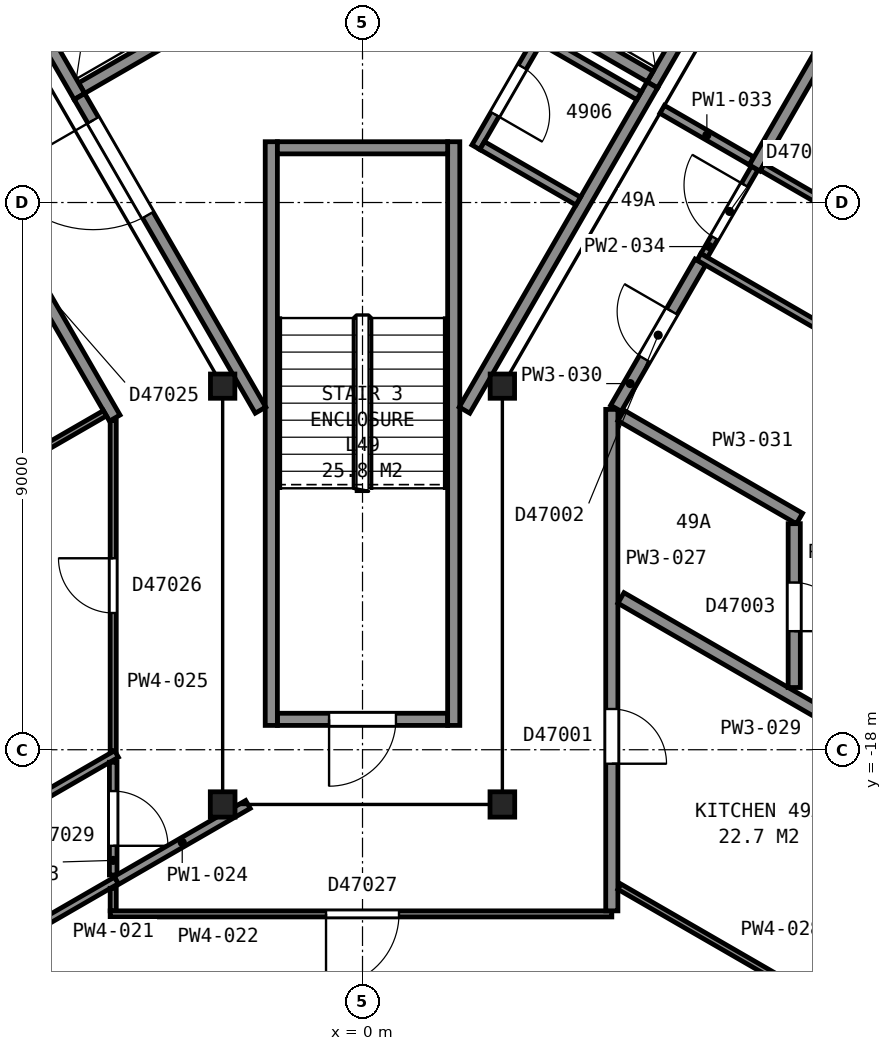
"""IFC4 building model, lengths in metres.
Left out: names, types, materials, properties, quantities, classifications, styles, units other than length and angle.
Written with IfcOpenShell. Run it as: python <this file> out.ifc"""

import sys

from ifc_helpers import new_model, si_unit, direction, frame, frame_2d, origin, origin_2d, place, context, subcontext, project, spatial, rectangle, i_section, extrude, element, fill, save


model = new_model("IFC4")
c1 = context("Model", 3, precision=1e-05, world=origin(), true_north=direction((0.0, 1.0)))
c2 = subcontext(c1, "Body", "Model", "MODEL_VIEW")
j1 = project(units=[si_unit("LENGTHUNIT", "METRE"), si_unit("PLANEANGLEUNIT", "RADIAN")], contexts=[c1])
p1 = place(None, origin())
s1 = spatial("IfcSite", under=j1, at=p1, CompositionType="ELEMENT")
p2 = place(p1, origin())
s2 = spatial("IfcBuilding", under=s1, at=p2, CompositionType="ELEMENT")
p3 = place(p2, frame((0.0, 0.0, 196.9)))
s3 = spatial("IfcBuildingStorey", under=s2, at=p3, CompositionType="ELEMENT", Elevation=196.9)
p4 = place(p3, frame((-2.3, -12.02, 0.0), z_axis=(0.0, 0.0, 1.0), x_axis=(1.0, 0.0, 0.0)))
e1 = element("IfcColumn", 1, at=p4, inside=s3, PredefinedType="COLUMN", context=c2, shape_type="SweptSolid", body=[
    extrude(i_section(OverallWidth=0.401, OverallDepth=0.399, WebThickness=0.025, FlangeThickness=0.04, FilletRadius=0.015, at=origin_2d()), origin(), (0.0, 0.0, 1.0), 3.7),
])
for number, where, z_axis, x_axis in (
    (2, (-2.3, -18.9, 0.0), (0.0, 0.0, 1.0), (-1.0, 0.0, 0.0)),
    (3, (2.3, -18.9, 0.0), (0.0, 0.0, 1.0), (-1.0, 0.0, 0.0)),
):
    element("IfcColumn", number, at=place(p3, frame(where, z_axis=z_axis, x_axis=x_axis)), inside=s3, PredefinedType="COLUMN", context=c2, shape_type="SweptSolid", body=[
        extrude(i_section(OverallWidth=0.406, OverallDepth=0.417, WebThickness=0.03, FlangeThickness=0.048, FilletRadius=0.015, at=origin_2d()), origin(), (0.0, 0.0, 1.0), 3.7),
    ])
p5 = place(p3, frame((2.3, -12.02, 0.0), z_axis=(0.0, 0.0, 1.0), x_axis=(1.0, 0.0, 0.0)))
e4 = element("IfcColumn", 4, at=p5, inside=s3, PredefinedType="COLUMN", context=c2, shape_type="SweptSolid", body=[
    extrude(i_section(OverallWidth=0.401, OverallDepth=0.399, WebThickness=0.025, FlangeThickness=0.04, FilletRadius=0.015, at=origin_2d()), origin(), (0.0, 0.0, 1.0), 3.7),
])
p6 = place(p3, frame((-1.4, -17.5, 0.0), z_axis=(0.0, 0.0, 1.0), x_axis=(1.0, 0.0, 0.0)))
e5 = element("IfcWall", 5, at=p6, inside=s3, PredefinedType="PARTITIONING", context=c2, shape_type="SweptSolid", body=[
    extrude(rectangle(XDim=2.8, YDim=0.2, at=frame_2d((1.4, 0.0))), origin(), (0.0, 0.0, 1.0), 3.45),
])
p7 = place(p6, frame((0.85, 0.0, 0.0)))
e6 = element("IfcOpeningElement", 6, at=p7, cuts=e5, PredefinedType="OPENING", context=c2, shape_type="SweptSolid", body=[
    extrude(rectangle(XDim=1.1, YDim=2.1, at=frame_2d((0.55, 1.05))), frame((0.0, 0.11, 0.0), z_axis=(0.0, -1.0, 0.0), x_axis=(1.0, 0.0, 0.0)), (0.0, 0.0, 1.0), 0.22),
])
for number, where, z_axis, x_axis in (
    (7, (1.5, -8.0, 0.0), (0.0, 0.0, 1.0), (0.0, -1.0, 0.0)),
    (8, (-1.5, -8.0, 0.0), (0.0, 0.0, 1.0), (0.0, -1.0, 0.0)),
):
    element("IfcWall", number, at=place(p3, frame(where, z_axis=z_axis, x_axis=x_axis)), inside=s3, PredefinedType="PARTITIONING", context=c2, shape_type="SweptSolid", body=[
        extrude(rectangle(XDim=9.6, YDim=0.2, at=frame_2d((4.8, 0.0))), origin(), (0.0, 0.0, 1.0), 3.45),
    ])
p8 = place(p3, frame((-1.4, -8.1, 0.0), z_axis=(0.0, 0.0, 1.0), x_axis=(1.0, 0.0, 0.0)))
e9 = element("IfcWall", 9, at=p8, inside=s3, PredefinedType="PARTITIONING", context=c2, shape_type="SweptSolid", body=[
    extrude(rectangle(XDim=2.8, YDim=0.2, at=frame_2d((1.4, 0.0))), origin(), (0.0, 0.0, 1.0), 3.45),
])
p9 = place(p3, frame((-4.62, -7.118, 0.0), z_axis=(0.0, 0.0, 1.0), x_axis=(0.866036909293, 0.499980071345, 0.0)))
e10 = element("IfcWall", 10, at=p9, inside=s3, PredefinedType="PARTITIONING", context=c2, shape_type="SweptSolid", body=[
    extrude(rectangle(XDim=1.75, YDim=0.2, at=frame_2d((0.875, 0.0))), origin(), (0.0, 0.0, 1.0), 3.7),
])
p10 = place(p3, frame((4.766, -7.065, 0.0), z_axis=(0.0, 0.0, 1.0), x_axis=(0.499948979701, 0.866054858364, 0.0)))
e11 = element("IfcWall", 11, at=p10, inside=s3, PredefinedType="PARTITIONING", context=c2, shape_type="SweptSolid", body=[
    extrude(rectangle(XDim=2.55, YDim=0.2, at=frame_2d((1.275, 0.0))), origin(), (0.0, 0.0, 1.0), 3.7),
])
p11 = place(p3, frame((-4.656, -7.255, 0.0), z_axis=(0.0, 0.0, 1.0), x_axis=(-0.499990435942, 0.866030925526, 0.0)))
e12 = element("IfcWall", 12, at=p11, inside=s3, PredefinedType="PARTITIONING", context=c2, shape_type="SweptSolid", body=[
    extrude(rectangle(XDim=2.55, YDim=0.2, at=frame_2d((1.275, 0.0))), origin(), (0.0, 0.0, 1.0), 3.7),
])
p12 = place(p3, frame((4.73, -6.928, 0.0), z_axis=(0.0, 0.0, 1.0), x_axis=(-0.866036909293, 0.499980071345, 0.0)))
e13 = element("IfcWall", 13, at=p12, inside=s3, PredefinedType="PARTITIONING", context=c2, shape_type="SweptSolid", body=[
    extrude(rectangle(XDim=1.75, YDim=0.2, at=frame_2d((0.875, 0.0))), origin(), (0.0, 0.0, 1.0), 3.7),
])
p13 = place(p3, frame((-4.655, -7.257, 0.0), z_axis=(0.0, 0.0, 1.0), x_axis=(0.499966124405, -0.866044960985, 0.0)))
e14 = element("IfcWall", 14, at=p13, inside=s3, PredefinedType="PARTITIONING", context=c2, shape_type="SweptSolid", body=[
    extrude(rectangle(XDim=5.956, YDim=0.2, at=frame_2d((2.978, 0.0))), origin(), (0.0, 0.0, 1.0), 3.45),
])
p14 = place(p13, frame((0.45, 0.0, 0.0)))
e15 = element("IfcOpeningElement", 15, at=p14, cuts=e14, PredefinedType="OPENING", context=c2, shape_type="SweptSolid", body=[
    extrude(rectangle(XDim=1.8, YDim=2.1, at=frame_2d((0.9, 1.05))), frame((0.0, 0.11, 0.0), z_axis=(0.0, -1.0, 0.0), x_axis=(1.0, 0.0, 0.0)), (0.0, 0.0, 1.0), 0.22),
])
p15 = place(p3, frame((1.677, -12.415, 0.0), z_axis=(0.0, 0.0, 1.0), x_axis=(0.500054337157, 0.865994029939, 0.0)))
e16 = element("IfcWall", 16, at=p15, inside=s3, PredefinedType="PARTITIONING", context=c2, shape_type="SweptSolid", body=[
    extrude(rectangle(XDim=6.177, YDim=0.2, at=frame_2d((3.088, 0.0))), origin(), (0.0, 0.0, 1.0), 3.45),
])
p16 = place(p3, frame((2.939, -6.229, 0.0), z_axis=(0.0, 0.0, 1.0), x_axis=(-0.499961633463, -0.866047553582, 0.0)))
e17 = element("IfcWall", 17, at=p16, inside=s3, PredefinedType="PARTITIONING", context=c2, shape_type="SweptSolid", body=[
    extrude(rectangle(XDim=2.15, YDim=0.15, at=frame_2d((1.075, 0.0))), origin(), (0.0, 0.0, 1.0), 3.45),
])
p17 = place(p16, frame((0.625, 0.0, 0.0)))
e18 = element("IfcOpeningElement", 18, at=p17, cuts=e17, PredefinedType="OPENING", context=c2, shape_type="SweptSolid", body=[
    extrude(rectangle(XDim=0.9, YDim=2.1, at=frame_2d((0.45, 1.05))), frame((0.0, 0.085, 0.0), z_axis=(0.0, -1.0, 0.0), x_axis=(1.0, 0.0, 0.0)), (0.0, 0.0, 1.0), 0.17),
])
p18 = place(p3, frame((1.967, -8.063, 0.0), z_axis=(0.0, 0.0, 1.0), x_axis=(0.865978377894, -0.500081442387, 0.0)))
e19 = element("IfcWall", 19, at=p18, inside=s3, PredefinedType="PARTITIONING", context=c2, shape_type="SweptSolid", body=[
    extrude(rectangle(XDim=1.825, YDim=0.15, at=frame_2d((0.913, 0.0))), origin(), (0.0, 0.0, 1.0), 3.45),
])
p19 = place(p3, frame((2.967, -6.332, 0.0), z_axis=(0.0, 0.0, 1.0), x_axis=(0.866036312054, -0.499981105847, 0.0)))
e20 = element("IfcWall", 20, at=p19, inside=s3, PredefinedType="PARTITIONING", context=c2, shape_type="SweptSolid", body=[
    extrude(rectangle(XDim=1.825, YDim=0.15, at=frame_2d((0.912, 0.0))), origin(), (0.0, 0.0, 1.0), 3.45),
])
p20 = place(p3, frame((-4.075, -12.545, 0.0), z_axis=(0.0, 0.0, 1.0), x_axis=(-0.499999743747, 0.866025551732, 0.0)))
e21 = element("IfcWall", 21, at=p20, inside=s3, PredefinedType="PARTITIONING", context=c2, shape_type="SweptSolid", body=[
    extrude(rectangle(XDim=17.656, YDim=0.2, at=frame_2d((8.828, 0.0))), origin(), (0.0, 0.0, 1.0), 2.362),
])
p21 = place(p20, frame((10.83, 0.0, 0.0)))
e22 = element("IfcOpeningElement", 22, at=p21, cuts=e21, PredefinedType="OPENING", context=c2, shape_type="SweptSolid", body=[
    extrude(rectangle(XDim=0.9, YDim=2.1, at=frame_2d((0.45, 1.05))), frame((0.0, 0.11, 0.0), z_axis=(0.0, -1.0, 0.0), x_axis=(1.0, 0.0, 0.0)), (0.0, 0.0, 1.0), 0.22),
])
p22 = place(p20, frame((7.148, 0.0, 0.0)))
e23 = element("IfcOpeningElement", 23, at=p22, cuts=e21, PredefinedType="OPENING", context=c2, shape_type="SweptSolid", body=[
    extrude(rectangle(XDim=0.9, YDim=2.1, at=frame_2d((0.45, 1.05))), frame((0.0, 0.11, 0.0), z_axis=(0.0, -1.0, 0.0), x_axis=(1.0, 0.0, 0.0)), (0.0, 0.0, 1.0), 0.22),
])
p23 = place(p20, frame((2.198, 0.0, 0.0)))
e24 = element("IfcOpeningElement", 24, at=p23, cuts=e21, PredefinedType="OPENING", context=c2, shape_type="SweptSolid", body=[
    extrude(rectangle(XDim=0.9, YDim=2.1, at=frame_2d((0.45, 1.05))), frame((0.0, 0.11, 0.0), z_axis=(0.0, -1.0, 0.0), x_axis=(1.0, 0.0, 0.0)), (0.0, 0.0, 1.0), 0.22),
])
p24 = place(p3, frame((-11.54, -16.682, 0.0), z_axis=(0.0, 0.0, 1.0), x_axis=(0.866063141794, 0.499934630153, 0.0)))
e25 = element("IfcWall", 25, at=p24, inside=s3, PredefinedType="PARTITIONING", context=c2, shape_type="SweptSolid", body=[
    extrude(rectangle(XDim=8.433, YDim=0.1, at=frame_2d((4.217, 0.0))), origin(), (0.0, 0.0, 1.0), 2.362),
])
p25 = place(p3, frame((-9.066, -20.968, 0.0), z_axis=(0.0, 0.0, 1.0), x_axis=(0.866023559602, 0.500003194204, 0.0)))
e26 = element("IfcWall", 26, at=p25, inside=s3, PredefinedType="PARTITIONING", context=c2, shape_type="SweptSolid", body=[
    extrude(rectangle(XDim=5.796, YDim=0.125, at=frame_2d((2.898, 0.0))), origin(), (0.0, 0.0, 1.0), 2.362),
])
p26 = place(p3, frame((-8.166, -22.527, 0.0), z_axis=(0.0, 0.0, 1.0), x_axis=(0.866042865666, 0.499969753915, 0.0)))
e27 = element("IfcWall", 27, at=p26, inside=s3, PredefinedType="PARTITIONING", context=c2, shape_type="SweptSolid", body=[
    extrude(rectangle(XDim=4.757, YDim=0.125, at=frame_2d((2.378, 0.0))), origin(), (0.0, 0.0, 1.0), 2.362),
])
p27 = place(p3, frame((-4.1, -20.65, 0.0), z_axis=(0.0, 0.0, 1.0), x_axis=(0.0, 1.0, 0.0)))
e28 = element("IfcWall", 28, at=p27, inside=s3, PredefinedType="PARTITIONING", context=c2, shape_type="SweptSolid", body=[
    extrude(rectangle(XDim=0.37, YDim=0.1, at=frame_2d((0.185, 0.0))), origin(), (0.0, 0.0, 1.0), 2.362),
])
p28 = place(p3, frame((4.1, -20.7, 0.0), z_axis=(0.0, 0.0, 1.0), x_axis=(-1.0, 0.0, 0.0)))
e29 = element("IfcWall", 29, at=p28, inside=s3, PredefinedType="PARTITIONING", context=c2, shape_type="SweptSolid", body=[
    extrude(rectangle(XDim=8.25, YDim=0.1, at=frame_2d((4.125, 0.0))), origin(), (0.0, 0.0, 1.0), 2.362),
])
p29 = place(p28, frame((3.5, 0.0, 0.0)))
e30 = element("IfcOpeningElement", 30, at=p29, cuts=e29, PredefinedType="OPENING", context=c2, shape_type="SweptSolid", body=[
    extrude(rectangle(XDim=1.2, YDim=2.1, at=frame_2d((0.6, 1.05))), frame((0.0, 0.06, 0.0), z_axis=(0.0, -1.0, 0.0), x_axis=(1.0, 0.0, 0.0)), (0.0, 0.0, 1.0), 0.12),
])
p30 = place(p3, frame((-4.1, -18.206, 0.0), z_axis=(0.0, 0.0, 1.0), x_axis=(0.0, -1.0, 0.0)))
e31 = element("IfcWall", 31, at=p30, inside=s3, PredefinedType="PARTITIONING", context=c2, shape_type="SweptSolid", body=[
    extrude(rectangle(XDim=1.854, YDim=0.125, at=frame_2d((0.927, 0.0))), origin(), (0.0, 0.0, 1.0), 2.362),
])
p31 = place(p30, frame((0.474, 0.0, 0.0)))
e32 = element("IfcOpeningElement", 32, at=p31, cuts=e31, PredefinedType="OPENING", context=c2, shape_type="SweptSolid", body=[
    extrude(rectangle(XDim=0.9, YDim=2.1, at=frame_2d((0.45, 1.05))), frame((0.0, 0.073, 0.0), z_axis=(0.0, -1.0, 0.0), x_axis=(1.0, 0.0, 0.0)), (0.0, 0.0, 1.0), 0.145),
])
p32 = place(p3, frame((-4.046, -20.149, 0.0), z_axis=(0.0, 0.0, 1.0), x_axis=(0.865916841101, 0.500187988959, 0.0)))
e33 = element("IfcWall", 33, at=p32, inside=s3, PredefinedType="PARTITIONING", context=c2, shape_type="SweptSolid", body=[
    extrude(rectangle(XDim=2.497, YDim=0.15, at=frame_2d((1.248, 0.0))), origin(), (0.0, 0.0, 1.0), 2.362),
])
p33 = place(p3, frame((-4.1, -18.016, 0.0), z_axis=(0.0, 0.0, 1.0), x_axis=(0.0, 1.0, 0.0)))
e34 = element("IfcWall", 34, at=p33, inside=s3, PredefinedType="PARTITIONING", context=c2, shape_type="SweptSolid", body=[
    extrude(rectangle(XDim=5.429, YDim=0.1, at=frame_2d((2.715, 0.0))), origin(), (0.0, 0.0, 1.0), 2.362),
])
p34 = place(p33, frame((2.265, 0.0, 0.0)))
e35 = element("IfcOpeningElement", 35, at=p34, cuts=e34, PredefinedType="OPENING", context=c2, shape_type="SweptSolid", body=[
    extrude(rectangle(XDim=0.9, YDim=2.1, at=frame_2d((0.45, 1.05))), frame((0.0, 0.06, 0.0), z_axis=(0.0, -1.0, 0.0), x_axis=(1.0, 0.0, 0.0)), (0.0, 0.0, 1.0), 0.12),
])
p35 = place(p3, frame((4.1, -12.402, 0.0), z_axis=(0.0, 0.0, 1.0), x_axis=(0.0, -1.0, 0.0)))
e36 = element("IfcWall", 36, at=p35, inside=s3, PredefinedType="PARTITIONING", context=c2, shape_type="SweptSolid", body=[
    extrude(rectangle(XDim=8.248, YDim=0.2, at=frame_2d((4.124, 0.0))), origin(), (0.0, 0.0, 1.0), 2.362),
])
p36 = place(p35, frame((4.928, 0.0, 0.0)))
e37 = element("IfcOpeningElement", 37, at=p36, cuts=e36, PredefinedType="OPENING", context=c2, shape_type="SweptSolid", body=[
    extrude(rectangle(XDim=0.9, YDim=2.1, at=frame_2d((0.45, 1.05))), frame((0.0, 0.11, 0.0), z_axis=(0.0, -1.0, 0.0), x_axis=(1.0, 0.0, 0.0)), (0.0, 0.0, 1.0), 0.22),
])
p37 = place(p3, frame((4.225, -20.252, 0.0), z_axis=(0.0, 0.0, 1.0), x_axis=(0.866048884701, -0.499959327653, 0.0)))
e38 = element("IfcWall", 38, at=p37, inside=s3, PredefinedType="PARTITIONING", context=c2, shape_type="SweptSolid", body=[
    extrude(rectangle(XDim=4.55, YDim=0.1, at=frame_2d((2.275, 0.0))), origin(), (0.0, 0.0, 1.0), 2.362),
])
p38 = place(p3, frame((4.25, -15.504, 0.0), z_axis=(0.0, 0.0, 1.0), x_axis=(0.866025383743, -0.500000034713, 0.0)))
e39 = element("IfcWall", 39, at=p38, inside=s3, PredefinedType="PARTITIONING", context=c2, shape_type="SweptSolid", body=[
    extrude(rectangle(XDim=6.903, YDim=0.2, at=frame_2d((3.451, 0.0))), origin(), (0.0, 0.0, 1.0), 2.362),
])
p39 = place(p3, frame((5.556, -9.98, 0.0), z_axis=(0.0, 0.0, 1.0), x_axis=(-0.499940639567, -0.866059672834, 0.0)))
e40 = element("IfcWall", 40, at=p39, inside=s3, PredefinedType="PARTITIONING", context=c2, shape_type="SweptSolid", body=[
    extrude(rectangle(XDim=2.777, YDim=0.2, at=frame_2d((1.388, 0.0))), origin(), (0.0, 0.0, 1.0), 2.362),
])
p40 = place(p39, frame((0.937, 0.0, 0.0)))
e41 = element("IfcOpeningElement", 41, at=p40, cuts=e40, PredefinedType="OPENING", context=c2, shape_type="SweptSolid", body=[
    extrude(rectangle(XDim=0.9, YDim=2.1, at=frame_2d((0.45, 1.05))), frame((0.0, 0.11, 0.0), z_axis=(0.0, -1.0, 0.0), x_axis=(1.0, 0.0, 0.0)), (0.0, 0.0, 1.0), 0.22),
])
p41 = place(p3, frame((4.25, -12.502, 0.0), z_axis=(0.0, 0.0, 1.0), x_axis=(0.866032087317, -0.499988423603, 0.0)))
e42 = element("IfcWall", 42, at=p41, inside=s3, PredefinedType="PARTITIONING", context=c2, shape_type="SweptSolid", body=[
    extrude(rectangle(XDim=3.39, YDim=0.2, at=frame_2d((1.695, 0.0))), origin(), (0.0, 0.0, 1.0), 2.362),
])
p42 = place(p3, frame((4.928, -7.468, 0.0), z_axis=(0.0, 0.0, 1.0), x_axis=(0.866075426483, -0.499913348133, 0.0)))
e43 = element("IfcWall", 43, at=p42, inside=s3, PredefinedType="PARTITIONING", context=c2, shape_type="SweptSolid", body=[
    extrude(rectangle(XDim=1.698, YDim=0.15, at=frame_2d((0.849, 0.0))), origin(), (0.0, 0.0, 1.0), 2.362),
])
p43 = place(p3, frame((5.62, -9.87, 0.0), z_axis=(0.0, 0.0, 1.0), x_axis=(0.500142759665, 0.865942965763, 0.0)))
e44 = element("IfcWall", 44, at=p43, inside=s3, PredefinedType="PARTITIONING", context=c2, shape_type="SweptSolid", body=[
    extrude(rectangle(XDim=1.659, YDim=0.125, at=frame_2d((0.83, 0.0))), origin(), (0.0, 0.0, 1.0), 2.362),
])
p44 = place(p43, frame((0.335, 0.0, 0.0)))
e45 = element("IfcOpeningElement", 45, at=p44, cuts=e44, PredefinedType="OPENING", context=c2, shape_type="SweptSolid", body=[
    extrude(rectangle(XDim=1.0, YDim=2.1, at=frame_2d((0.5, 1.05))), frame((0.0, 0.073, 0.0), z_axis=(0.0, -1.0, 0.0), x_axis=(1.0, 0.0, 0.0)), (0.0, 0.0, 1.0), 0.145),
])
p45 = place(p3, frame((5.533, -9.895, 0.0), z_axis=(0.0, 0.0, 1.0), x_axis=(0.865995449608, -0.500051878567, 0.0)))
e46 = element("IfcWall", 46, at=p45, inside=s3, PredefinedType="PARTITIONING", context=c2, shape_type="SweptSolid", body=[
    extrude(rectangle(XDim=8.596, YDim=0.125, at=frame_2d((4.298, 0.0))), origin(), (0.0, 0.0, 1.0), 2.362),
])
p46 = place(p3, frame((12.903, 2.745, 0.0), z_axis=(0.0, 0.0, 1.0), x_axis=(-0.499992063946, -0.866029985619, 0.0)))
e47 = element("IfcWall", 47, at=p46, inside=s3, PredefinedType="PARTITIONING", context=c2, shape_type="SweptSolid", body=[
    extrude(rectangle(XDim=12.907, YDim=0.2, at=frame_2d((6.454, 0.0))), origin(), (0.0, 0.0, 1.0), 2.362),
])
p47 = place(p46, frame((9.032, 0.0, 0.0)))
e48 = element("IfcOpeningElement", 48, at=p47, cuts=e47, PredefinedType="OPENING", context=c2, shape_type="SweptSolid", body=[
    extrude(rectangle(XDim=0.9, YDim=2.1, at=frame_2d((0.45, 1.05))), frame((0.0, 0.11, 0.0), z_axis=(0.0, -1.0, 0.0), x_axis=(1.0, 0.0, 0.0)), (0.0, 0.0, 1.0), 0.22),
])
p48 = place(p46, frame((5.349, 0.0, 0.0)))
e49 = element("IfcOpeningElement", 49, at=p48, cuts=e47, PredefinedType="OPENING", context=c2, shape_type="SweptSolid", body=[
    extrude(rectangle(XDim=0.9, YDim=2.1, at=frame_2d((0.45, 1.05))), frame((0.0, 0.11, 0.0), z_axis=(0.0, -1.0, 0.0), x_axis=(1.0, 0.0, 0.0)), (0.0, 0.0, 1.0), 0.22),
])
p49 = place(p3, frame((6.576, -8.419, 0.0), z_axis=(0.0, 0.0, 1.0), x_axis=(0.866048155274, -0.499960591193, 0.0)))
e50 = element("IfcWall", 50, at=p49, inside=s3, PredefinedType="PARTITIONING", context=c2, shape_type="SweptSolid", body=[
    extrude(rectangle(XDim=8.431, YDim=0.125, at=frame_2d((4.215, 0.0))), origin(), (0.0, 0.0, 1.0), 2.362),
])
p50 = place(p3, frame((7.1, -16.977, 0.0), z_axis=(0.0, 0.0, 1.0), x_axis=(0.0, 1.0, 0.0)))
e51 = element("IfcWall", 51, at=p50, inside=s3, PredefinedType="PARTITIONING", context=c2, shape_type="SweptSolid", body=[
    extrude(rectangle(XDim=2.695, YDim=0.2, at=frame_2d((1.347, 0.0))), origin(), (0.0, 0.0, 1.0), 2.362),
])
p51 = place(p50, frame((0.927, 0.0, 0.0)))
e52 = element("IfcOpeningElement", 52, at=p51, cuts=e51, PredefinedType="OPENING", context=c2, shape_type="SweptSolid", body=[
    extrude(rectangle(XDim=0.8, YDim=2.1, at=frame_2d((0.4, 1.05))), frame((0.0, 0.11, 0.0), z_axis=(0.0, -1.0, 0.0), x_axis=(1.0, 0.0, 0.0)), (0.0, 0.0, 1.0), 0.22),
])
p52 = place(p7, origin())
e53 = element("IfcDoor", 53, at=p52, inside=s3, OperationType="SINGLE_SWING_LEFT", PredefinedType="DOOR", context=c2, shape_type="SweptSolid", body=[
    extrude(rectangle(XDim=1.1, YDim=2.1, at=frame_2d((0.55, 1.05))), frame((0.0, 0.025, 0.0), z_axis=(0.0, -1.0, 0.0), x_axis=(1.0, 0.0, 0.0)), (0.0, 0.0, 1.0), 0.05),
])
fill(e6, e53)
p53 = place(p14, origin())
e54 = element("IfcDoor", 54, at=p53, inside=s3, OperationType="DOUBLE_DOOR_SINGLE_SWING", PredefinedType="DOOR", context=c2, shape_type="SweptSolid", body=[
    extrude(rectangle(XDim=1.8, YDim=2.1, at=frame_2d((0.9, 1.05))), frame((0.0, 0.025, 0.0), z_axis=(0.0, -1.0, 0.0), x_axis=(1.0, 0.0, 0.0)), (0.0, 0.0, 1.0), 0.05),
])
fill(e15, e54)
p54 = place(p17, origin())
e55 = element("IfcDoor", 55, at=p54, inside=s3, OperationType="SINGLE_SWING_RIGHT", PredefinedType="DOOR", context=c2, shape_type="SweptSolid", body=[
    extrude(rectangle(XDim=0.9, YDim=2.1, at=frame_2d((0.45, 1.05))), frame((0.0, 0.025, 0.0), z_axis=(0.0, -1.0, 0.0), x_axis=(1.0, 0.0, 0.0)), (0.0, 0.0, 1.0), 0.05),
])
fill(e18, e55)
p55 = place(p29, origin())
e56 = element("IfcDoor", 56, at=p55, inside=s3, OperationType="SINGLE_SWING_RIGHT", PredefinedType="DOOR", context=c2, shape_type="SweptSolid", body=[
    extrude(rectangle(XDim=1.2, YDim=2.1, at=frame_2d((0.6, 1.05))), frame((0.0, 0.025, 0.0), z_axis=(0.0, -1.0, 0.0), x_axis=(1.0, 0.0, 0.0)), (0.0, 0.0, 1.0), 0.05),
])
fill(e30, e56)
p56 = place(p31, origin())
e57 = element("IfcDoor", 57, at=p56, inside=s3, OperationType="SINGLE_SWING_RIGHT", PredefinedType="DOOR", context=c2, shape_type="SweptSolid", body=[
    extrude(rectangle(XDim=0.9, YDim=2.1, at=frame_2d((0.45, 1.05))), frame((0.0, 0.025, 0.0), z_axis=(0.0, -1.0, 0.0), x_axis=(1.0, 0.0, 0.0)), (0.0, 0.0, 1.0), 0.05),
])
fill(e32, e57)
p57 = place(p34, origin())
e58 = element("IfcDoor", 58, at=p57, inside=s3, OperationType="SINGLE_SWING_RIGHT", PredefinedType="DOOR", context=c2, shape_type="SweptSolid", body=[
    extrude(rectangle(XDim=0.9, YDim=2.1, at=frame_2d((0.45, 1.05))), frame((0.0, 0.025, 0.0), z_axis=(0.0, -1.0, 0.0), x_axis=(1.0, 0.0, 0.0)), (0.0, 0.0, 1.0), 0.05),
])
fill(e35, e58)
p58 = place(p36, origin())
e59 = element("IfcDoor", 59, at=p58, inside=s3, OperationType="SINGLE_SWING_RIGHT", PredefinedType="DOOR", context=c2, shape_type="SweptSolid", body=[
    extrude(rectangle(XDim=0.9, YDim=2.1, at=frame_2d((0.45, 1.05))), frame((0.0, 0.025, 0.0), z_axis=(0.0, -1.0, 0.0), x_axis=(1.0, 0.0, 0.0)), (0.0, 0.0, 1.0), 0.05),
])
fill(e37, e59)
p59 = place(p40, origin())
e60 = element("IfcDoor", 60, at=p59, inside=s3, OperationType="SINGLE_SWING_LEFT", PredefinedType="DOOR", context=c2, shape_type="SweptSolid", body=[
    extrude(rectangle(XDim=0.9, YDim=2.1, at=frame_2d((0.45, 1.05))), frame((0.0, 0.025, 0.0), z_axis=(0.0, -1.0, 0.0), x_axis=(1.0, 0.0, 0.0)), (0.0, 0.0, 1.0), 0.05),
])
fill(e41, e60)
p60 = place(p44, origin())
e61 = element("IfcDoor", 61, at=p60, inside=s3, OperationType="SINGLE_SWING_RIGHT", PredefinedType="DOOR", context=c2, shape_type="SweptSolid", body=[
    extrude(rectangle(XDim=1.0, YDim=2.1, at=frame_2d((0.5, 1.05))), frame((0.0, 0.025, 0.0), z_axis=(0.0, -1.0, 0.0), x_axis=(1.0, 0.0, 0.0)), (0.0, 0.0, 1.0), 0.05),
])
fill(e45, e61)
p61 = place(p51, origin())
e62 = element("IfcDoor", 62, at=p61, inside=s3, OperationType="SINGLE_SWING_LEFT", PredefinedType="DOOR", context=c2, shape_type="SweptSolid", body=[
    extrude(rectangle(XDim=0.8, YDim=2.1, at=frame_2d((0.4, 1.05))), frame((0.0, 0.025, 0.0), z_axis=(0.0, -1.0, 0.0), x_axis=(1.0, 0.0, 0.0)), (0.0, 0.0, 1.0), 0.05),
])
fill(e52, e62)
save(model, sys.argv[1])
